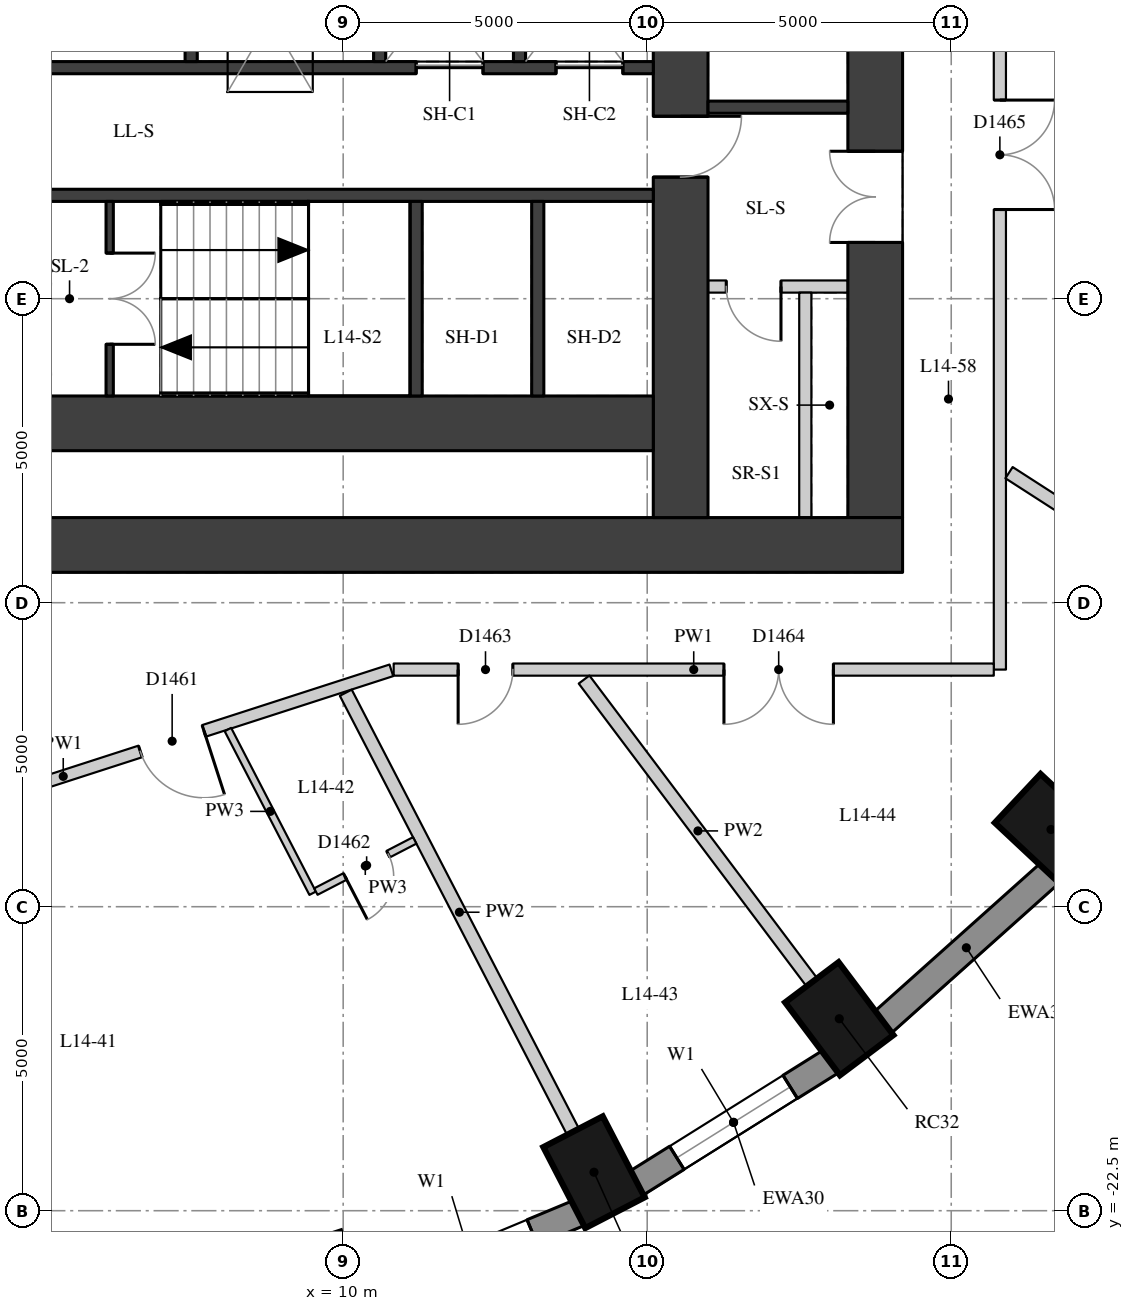
"""IFC4 building model, lengths in metres.
Left out: names, types, materials, properties, quantities, classifications, styles, units other than length and angle.
Written with IfcOpenShell. Run it as: python <this file> out.ifc"""

import sys

from ifc_helpers import new_model, si_unit, direction, frame, frame_2d, origin, origin_2d, place, context, subcontext, project, spatial, rectangle, extrude, element, fill, save


model = new_model("IFC4")
c1 = context("Model", 3, precision=1e-05, world=origin(), true_north=direction((0.0, 1.0)))
c2 = subcontext(c1, "Body", "Model", "MODEL_VIEW")
j1 = project(units=[si_unit("LENGTHUNIT", "METRE"), si_unit("PLANEANGLEUNIT", "RADIAN")], contexts=[c1])
p1 = place(None, origin())
s1 = spatial("IfcSite", under=j1, at=p1, CompositionType="ELEMENT")
p2 = place(p1, origin())
s2 = spatial("IfcBuilding", under=s1, at=p2, CompositionType="ELEMENT")
p3 = place(p2, frame((0.0, 0.0, 54.7)))
s3 = spatial("IfcBuildingStorey", under=s2, at=p3, CompositionType="ELEMENT", Elevation=54.7)
for number, where, z_axis, x_axis in (
    (1, (14.125, -21.867, 0.0), (0.0, 0.0, 1.0), (0.46, -0.888, 0.0)),
    (2, (18.159, -19.343, 0.0), (0.0, 0.0, 1.0), (0.601, -0.799, 0.0)),
    (3, (21.641, -16.23, 0.0), (0.0, 0.0, 1.0), (0.73, -0.683, 0.0)),
):
    element("IfcColumn", number, at=place(p3, frame(where, z_axis=z_axis, x_axis=x_axis)), inside=s3, PredefinedType="COLUMN", context=c2, shape_type="SweptSolid", body=[
        extrude(rectangle(XDim=1.5, YDim=1.1, at=origin_2d()), origin(), (0.0, 0.0, 1.0), 3.3),
    ])
p4 = place(p3, frame((10.315, -24.021, 0.0), z_axis=(0.0, 0.0, 1.0), x_axis=(0.923031964282, 0.384723267966, 0.0)))
e4 = element("IfcWall", 4, at=p4, inside=s3, PredefinedType="SOLIDWALL", context=c2, shape_type="SweptSolid", body=[
    extrude(rectangle(XDim=3.856, YDim=0.45, at=frame_2d((1.928, 0.0))), origin(), (0.0, 0.0, 1.0), 3.02),
])
p5 = place(p4, frame((0.828, 0.0, 0.4)))
e5 = element("IfcOpeningElement", 5, at=p5, cuts=e4, PredefinedType="OPENING", context=c2, shape_type="SweptSolid", body=[
    extrude(rectangle(XDim=2.2, YDim=1.75, at=frame_2d((1.1, 0.875))), frame((0.0, 0.235, 0.0), z_axis=(0.0, -1.0, 0.0), x_axis=(1.0, 0.0, 0.0)), (0.0, 0.0, 1.0), 0.47),
])
p6 = place(p3, frame((14.817, -22.051, 0.0), z_axis=(0.0, 0.0, 1.0), x_axis=(0.847635480093, 0.530579016629, 0.0)))
e6 = element("IfcWall", 6, at=p6, inside=s3, PredefinedType="SOLIDWALL", context=c2, shape_type="SweptSolid", body=[
    extrude(rectangle(XDim=3.782, YDim=0.45, at=frame_2d((1.891, 0.0))), origin(), (0.0, 0.0, 1.0), 3.02),
])
p7 = place(p6, frame((0.791, 0.0, 0.4)))
e7 = element("IfcOpeningElement", 7, at=p7, cuts=e6, PredefinedType="OPENING", context=c2, shape_type="SweptSolid", body=[
    extrude(rectangle(XDim=2.2, YDim=1.75, at=frame_2d((1.1, 0.875))), frame((0.0, 0.235, 0.0), z_axis=(0.0, -1.0, 0.0), x_axis=(1.0, 0.0, 0.0)), (0.0, 0.0, 1.0), 0.47),
])
p8 = place(p3, frame((18.871, -19.407, 0.0), z_axis=(0.0, 0.0, 1.0), x_axis=(0.745526233716, 0.66647628228, 0.0)))
e8 = element("IfcWall", 8, at=p8, inside=s3, PredefinedType="SOLIDWALL", context=c2, shape_type="SweptSolid", body=[
    extrude(rectangle(XDim=3.697, YDim=0.45, at=frame_2d((1.848, 0.0))), origin(), (0.0, 0.0, 1.0), 3.02),
])
p9 = place(p3, frame((18.75, -11.1, 0.0), z_axis=(0.0, 0.0, 1.0), x_axis=(0.0, 1.0, 0.0)))
e9 = element("IfcWall", 9, at=p9, inside=s3, PredefinedType="SHEAR", context=c2, shape_type="SweptSolid", body=[
    extrude(rectangle(XDim=22.2, YDim=0.9, at=frame_2d((11.1, 0.0))), origin(), (0.0, 0.0, 1.0), 3.02),
])
p10 = place(p9, frame((15.925, 0.0, 0.0)))
e10 = element("IfcOpeningElement", 10, at=p10, cuts=e9, PredefinedType="OPENING", context=c2, shape_type="SweptSolid", body=[
    extrude(rectangle(XDim=1.5, YDim=2.1, at=frame_2d((0.75, 1.05))), frame((0.0, 0.46, 0.0), z_axis=(0.0, -1.0, 0.0), x_axis=(1.0, 0.0, 0.0)), (0.0, 0.0, 1.0), 0.92),
])
p11 = place(p9, frame((4.525, 0.0, 0.0)))
e11 = element("IfcOpeningElement", 11, at=p11, cuts=e9, PredefinedType="OPENING", context=c2, shape_type="SweptSolid", body=[
    extrude(rectangle(XDim=1.5, YDim=2.1, at=frame_2d((0.75, 1.05))), frame((0.0, 0.46, 0.0), z_axis=(0.0, -1.0, 0.0), x_axis=(1.0, 0.0, 0.0)), (0.0, 0.0, 1.0), 0.92),
])
p12 = place(p3, frame((4.0, -11.55, 0.0), z_axis=(0.0, 0.0, 1.0), x_axis=(1.0, 0.0, 0.0)))
e12 = element("IfcWall", 12, at=p12, inside=s3, PredefinedType="SHEAR", context=c2, shape_type="SweptSolid", body=[
    extrude(rectangle(XDim=15.2, YDim=0.9, at=frame_2d((7.6, 0.0))), origin(), (0.0, 0.0, 1.0), 3.02),
])
p13 = place(p3, frame((15.55, -11.1, 0.0), z_axis=(0.0, 0.0, 1.0), x_axis=(0.0, 1.0, 0.0)))
e13 = element("IfcWall", 13, at=p13, inside=s3, PredefinedType="SHEAR", context=c2, shape_type="SweptSolid", body=[
    extrude(rectangle(XDim=22.2, YDim=0.9, at=frame_2d((11.1, 0.0))), origin(), (0.0, 0.0, 1.0), 3.02),
])
p14 = place(p13, frame((15.6, 0.0, 0.0)))
e14 = element("IfcOpeningElement", 14, at=p14, cuts=e13, PredefinedType="OPENING", context=c2, shape_type="SweptSolid", body=[
    extrude(rectangle(XDim=1.0, YDim=2.1, at=frame_2d((0.5, 1.05))), frame((0.0, 0.46, 0.0), z_axis=(0.0, -1.0, 0.0), x_axis=(1.0, 0.0, 0.0)), (0.0, 0.0, 1.0), 0.92),
])
p15 = place(p13, frame((5.6, 0.0, 0.0)))
e15 = element("IfcOpeningElement", 15, at=p15, cuts=e13, PredefinedType="OPENING", context=c2, shape_type="SweptSolid", body=[
    extrude(rectangle(XDim=1.0, YDim=2.1, at=frame_2d((0.5, 1.05))), frame((0.0, 0.46, 0.0), z_axis=(0.0, -1.0, 0.0), x_axis=(1.0, 0.0, 0.0)), (0.0, 0.0, 1.0), 0.92),
])
p16 = place(p3, frame((4.9, -9.55, 0.0), z_axis=(0.0, 0.0, 1.0), x_axis=(1.0, 0.0, 0.0)))
e16 = element("IfcWall", 16, at=p16, inside=s3, PredefinedType="SHEAR", context=c2, shape_type="SweptSolid", body=[
    extrude(rectangle(XDim=10.2, YDim=0.9, at=frame_2d((5.1, 0.0))), origin(), (0.0, 0.0, 1.0), 3.02),
])
p17 = place(p3, frame((4.9, -3.7, 0.0), z_axis=(0.0, 0.0, 1.0), x_axis=(1.0, 0.0, 0.0)))
e17 = element("IfcWall", 17, at=p17, inside=s3, PredefinedType="SHEAR", context=c2, shape_type="SweptSolid", body=[
    extrude(rectangle(XDim=10.2, YDim=0.2, at=frame_2d((5.1, 0.0))), origin(), (0.0, 0.0, 1.0), 3.02),
])
p18 = place(p17, frame((6.3, 0.0, 0.0)))
e18 = element("IfcOpeningElement", 18, at=p18, cuts=e17, PredefinedType="OPENING", context=c2, shape_type="SweptSolid", body=[
    extrude(rectangle(XDim=1.1, YDim=2.1, at=frame_2d((0.55, 1.05))), frame((0.0, 0.11, 0.0), z_axis=(0.0, -1.0, 0.0), x_axis=(1.0, 0.0, 0.0)), (0.0, 0.0, 1.0), 0.22),
])
p19 = place(p17, frame((8.6, 0.0, 0.0)))
e19 = element("IfcOpeningElement", 19, at=p19, cuts=e17, PredefinedType="OPENING", context=c2, shape_type="SweptSolid", body=[
    extrude(rectangle(XDim=1.1, YDim=2.1, at=frame_2d((0.55, 1.05))), frame((0.0, 0.11, 0.0), z_axis=(0.0, -1.0, 0.0), x_axis=(1.0, 0.0, 0.0)), (0.0, 0.0, 1.0), 0.22),
])
p20 = place(p3, frame((4.9, -5.8, 0.0), z_axis=(0.0, 0.0, 1.0), x_axis=(1.0, 0.0, 0.0)))
e20 = element("IfcWall", 20, at=p20, inside=s3, PredefinedType="SHEAR", context=c2, shape_type="SweptSolid", body=[
    extrude(rectangle(XDim=10.2, YDim=0.2, at=frame_2d((5.1, 0.0))), origin(), (0.0, 0.0, 1.0), 3.02),
])
for number, where, z_axis, x_axis in (
    (21, (11.2, -9.1, 0.0), (0.0, 0.0, 1.0), (0.0, 1.0, 0.0)),
    (22, (13.2, -9.1, 0.0), (0.0, 0.0, 1.0), (0.0, 1.0, 0.0)),
):
    element("IfcWall", number, at=place(p3, frame(where, z_axis=z_axis, x_axis=x_axis)), inside=s3, PredefinedType="SHEAR", context=c2, shape_type="SweptSolid", body=[
        extrude(rectangle(XDim=3.2, YDim=0.2, at=frame_2d((1.6, 0.0))), origin(), (0.0, 0.0, 1.0), 3.02),
    ])
p21 = place(p3, frame((7.5, -3.6, 0.0), z_axis=(0.0, 0.0, 1.0), x_axis=(0.0, 1.0, 0.0)))
e23 = element("IfcWall", 23, at=p21, inside=s3, PredefinedType="SHEAR", context=c2, shape_type="SweptSolid", body=[
    extrude(rectangle(XDim=2.5, YDim=0.2, at=frame_2d((1.25, 0.0))), origin(), (0.0, 0.0, 1.0), 3.02),
])
p22 = place(p21, frame((0.7, 0.0, 0.0)))
e24 = element("IfcOpeningElement", 24, at=p22, cuts=e23, PredefinedType="OPENING", context=c2, shape_type="SweptSolid", body=[
    extrude(rectangle(XDim=1.1, YDim=2.1, at=frame_2d((0.55, 1.05))), frame((0.0, 0.11, 0.0), z_axis=(0.0, -1.0, 0.0), x_axis=(1.0, 0.0, 0.0)), (0.0, 0.0, 1.0), 0.22),
])
for number, where, z_axis, x_axis in (
    (25, (10.6, -3.6, 0.0), (0.0, 0.0, 1.0), (0.0, 1.0, 0.0)),
    (26, (12.9, -3.6, 0.0), (0.0, 0.0, 1.0), (0.0, 1.0, 0.0)),
):
    element("IfcWall", number, at=place(p3, frame(where, z_axis=z_axis, x_axis=x_axis)), inside=s3, PredefinedType="SHEAR", context=c2, shape_type="SweptSolid", body=[
        extrude(rectangle(XDim=2.5, YDim=0.2, at=frame_2d((1.25, 0.0))), origin(), (0.0, 0.0, 1.0), 3.02),
    ])
p23 = place(p3, frame((6.16, -9.1, 0.0), z_axis=(0.0, 0.0, 1.0), x_axis=(0.0, 1.0, 0.0)))
e27 = element("IfcWall", 27, at=p23, inside=s3, PredefinedType="SHEAR", context=c2, shape_type="SweptSolid", body=[
    extrude(rectangle(XDim=3.2, YDim=0.12, at=frame_2d((1.6, 0.0))), origin(), (0.0, 0.0, 1.0), 3.02),
])
p24 = place(p23, frame((0.85, 0.0, 0.0)))
e28 = element("IfcOpeningElement", 28, at=p24, cuts=e27, PredefinedType="OPENING", context=c2, shape_type="SweptSolid", body=[
    extrude(rectangle(XDim=1.5, YDim=2.1, at=frame_2d((0.75, 1.05))), frame((0.0, 0.07, 0.0), z_axis=(0.0, -1.0, 0.0), x_axis=(1.0, 0.0, 0.0)), (0.0, 0.0, 1.0), 0.14),
])
p25 = place(p3, frame((16.0, -4.35, 0.0), z_axis=(0.0, 0.0, 1.0), x_axis=(1.0, 0.0, 0.0)))
e29 = element("IfcWall", 29, at=p25, inside=s3, PredefinedType="SHEAR", context=c2, shape_type="SweptSolid", body=[
    extrude(rectangle(XDim=2.3, YDim=0.2, at=frame_2d((1.15, 0.0))), origin(), (0.0, 0.0, 1.0), 3.02),
])
p26 = place(p3, frame((16.0, -7.3, 0.0), z_axis=(0.0, 0.0, 1.0), x_axis=(1.0, 0.0, 0.0)))
e30 = element("IfcWall", 30, at=p26, inside=s3, PredefinedType="PARTITIONING", context=c2, shape_type="SweptSolid", body=[
    extrude(rectangle(XDim=2.3, YDim=0.2, at=frame_2d((1.15, 0.0))), origin(), (0.0, 0.0, 1.0), 3.02),
])
p27 = place(p26, frame((0.3, 0.0, 0.0)))
e31 = element("IfcOpeningElement", 31, at=p27, cuts=e30, PredefinedType="OPENING", context=c2, shape_type="SweptSolid", body=[
    extrude(rectangle(XDim=0.9, YDim=2.1, at=frame_2d((0.45, 1.05))), frame((0.0, 0.11, 0.0), z_axis=(0.0, -1.0, 0.0), x_axis=(1.0, 0.0, 0.0)), (0.0, 0.0, 1.0), 0.22),
])
p28 = place(p3, frame((17.6, -11.1, 0.0), z_axis=(0.0, 0.0, 1.0), x_axis=(0.0, 1.0, 0.0)))
e32 = element("IfcWall", 32, at=p28, inside=s3, PredefinedType="PARTITIONING", context=c2, shape_type="SweptSolid", body=[
    extrude(rectangle(XDim=3.7, YDim=0.2, at=frame_2d((1.85, 0.0))), origin(), (0.0, 0.0, 1.0), 3.02),
])
p29 = place(p3, frame((20.8, 13.5, 0.0), z_axis=(0.0, 0.0, 1.0), x_axis=(0.0, -1.0, 0.0)))
e33 = element("IfcWall", 33, at=p29, inside=s3, PredefinedType="PARTITIONING", context=c2, shape_type="SweptSolid", body=[
    extrude(rectangle(XDim=27.1, YDim=0.2, at=frame_2d((13.55, 0.0))), origin(), (0.0, 0.0, 1.0), 3.02),
])
p30 = place(p29, frame((17.733, 0.0, 0.0)))
e34 = element("IfcOpeningElement", 34, at=p30, cuts=e33, PredefinedType="OPENING", context=c2, shape_type="SweptSolid", body=[
    extrude(rectangle(XDim=1.8, YDim=2.1, at=frame_2d((0.9, 1.05))), frame((0.0, 0.11, 0.0), z_axis=(0.0, -1.0, 0.0), x_axis=(1.0, 0.0, 0.0)), (0.0, 0.0, 1.0), 0.22),
])
p31 = place(p29, frame((9.448, 0.0, 0.0)))
e35 = element("IfcOpeningElement", 35, at=p31, cuts=e33, PredefinedType="OPENING", context=c2, shape_type="SweptSolid", body=[
    extrude(rectangle(XDim=1.8, YDim=2.1, at=frame_2d((0.9, 1.05))), frame((0.0, 0.11, 0.0), z_axis=(0.0, -1.0, 0.0), x_axis=(1.0, 0.0, 0.0)), (0.0, 0.0, 1.0), 0.22),
])
p32 = place(p29, frame((2.704, 0.0, 0.0)))
e36 = element("IfcOpeningElement", 36, at=p32, cuts=e33, PredefinedType="OPENING", context=c2, shape_type="SweptSolid", body=[
    extrude(rectangle(XDim=1.8, YDim=2.1, at=frame_2d((0.9, 1.05))), frame((0.0, 0.11, 0.0), z_axis=(0.0, -1.0, 0.0), x_axis=(1.0, 0.0, 0.0)), (0.0, 0.0, 1.0), 0.22),
])
p33 = place(p3, frame((20.7, -13.6, 0.0), z_axis=(0.0, 0.0, 1.0), x_axis=(-1.0, 0.0, 0.0)))
e37 = element("IfcWall", 37, at=p33, inside=s3, PredefinedType="PARTITIONING", context=c2, shape_type="SweptSolid", body=[
    extrude(rectangle(XDim=9.87, YDim=0.2, at=frame_2d((4.935, 0.0))), origin(), (0.0, 0.0, 1.0), 3.02),
])
p34 = place(p33, frame((7.909, 0.0, 0.0)))
e38 = element("IfcOpeningElement", 38, at=p34, cuts=e37, PredefinedType="OPENING", context=c2, shape_type="SweptSolid", body=[
    extrude(rectangle(XDim=0.9, YDim=2.1, at=frame_2d((0.45, 1.05))), frame((0.0, 0.11, 0.0), z_axis=(0.0, -1.0, 0.0), x_axis=(1.0, 0.0, 0.0)), (0.0, 0.0, 1.0), 0.22),
])
p35 = place(p33, frame((2.638, 0.0, 0.0)))
e39 = element("IfcOpeningElement", 39, at=p35, cuts=e37, PredefinedType="OPENING", context=c2, shape_type="SweptSolid", body=[
    extrude(rectangle(XDim=1.8, YDim=2.1, at=frame_2d((0.9, 1.05))), frame((0.0, 0.11, 0.0), z_axis=(0.0, -1.0, 0.0), x_axis=(1.0, 0.0, 0.0)), (0.0, 0.0, 1.0), 0.22),
])
p36 = place(p3, frame((10.792, -13.612, 0.0), z_axis=(0.0, 0.0, 1.0), x_axis=(-0.951542928403, -0.307515943336, 0.0)))
e40 = element("IfcWall", 40, at=p36, inside=s3, PredefinedType="PARTITIONING", context=c2, shape_type="SweptSolid", body=[
    extrude(rectangle(XDim=11.342, YDim=0.2, at=frame_2d((5.671, 0.0))), origin(), (0.0, 0.0, 1.0), 3.02),
])
p37 = place(p36, frame((3.239, 0.0, 0.0)))
e41 = element("IfcOpeningElement", 41, at=p37, cuts=e40, PredefinedType="OPENING", context=c2, shape_type="SweptSolid", body=[
    extrude(rectangle(XDim=1.1, YDim=2.1, at=frame_2d((0.55, 1.05))), frame((0.0, 0.11, 0.0), z_axis=(0.0, -1.0, 0.0), x_axis=(1.0, 0.0, 0.0)), (0.0, 0.0, 1.0), 0.22),
])
p38 = place(p3, frame((13.78, -21.201, 0.0), z_axis=(0.0, 0.0, 1.0), x_axis=(-0.459685115008, 0.888081975405, 0.0)))
e42 = element("IfcWall", 42, at=p38, inside=s3, PredefinedType="PARTITIONING", context=c2, shape_type="SweptSolid", body=[
    extrude(rectangle(XDim=8.131, YDim=0.22, at=frame_2d((4.065, 0.0))), origin(), (0.0, 0.0, 1.0), 3.02),
])
p39 = place(p3, frame((17.708, -18.743, 0.0), z_axis=(0.0, 0.0, 1.0), x_axis=(-0.601177883261, 0.799115231164, 0.0)))
e43 = element("IfcWall", 43, at=p39, inside=s3, PredefinedType="PARTITIONING", context=c2, shape_type="SweptSolid", body=[
    extrude(rectangle(XDim=6.231, YDim=0.22, at=frame_2d((3.116, 0.0))), origin(), (0.0, 0.0, 1.0), 3.02),
])
p40 = place(p3, frame((23.835, -12.219, 0.0), z_axis=(0.0, 0.0, 1.0), x_axis=(-0.840694872373, 0.541509124176, 0.0)))
e44 = element("IfcWall", 44, at=p40, inside=s3, PredefinedType="PARTITIONING", context=c2, shape_type="SweptSolid", body=[
    extrude(rectangle(XDim=3.43, YDim=0.22, at=frame_2d((1.715, 0.0))), origin(), (0.0, 0.0, 1.0), 3.02),
])
p41 = place(p3, frame((8.104, -14.586, 0.0), z_axis=(0.0, 0.0, 1.0), x_axis=(0.459668270166, -0.888090694357, 0.0)))
e45 = element("IfcWall", 45, at=p41, inside=s3, PredefinedType="PARTITIONING", context=c2, shape_type="SweptSolid", body=[
    extrude(rectangle(XDim=3.032, YDim=0.12, at=frame_2d((1.516, 0.0))), origin(), (0.0, 0.0, 1.0), 3.02),
])
p42 = place(p3, frame((9.551, -17.251, 0.0), z_axis=(0.0, 0.0, 1.0), x_axis=(0.88806930088, 0.459709600546, 0.0)))
e46 = element("IfcWall", 46, at=p42, inside=s3, PredefinedType="PARTITIONING", context=c2, shape_type="SweptSolid", body=[
    extrude(rectangle(XDim=1.83, YDim=0.12, at=frame_2d((0.915, 0.0))), origin(), (0.0, 0.0, 1.0), 3.02),
])
p43 = place(p42, frame((0.54, 0.0, 0.0)))
e47 = element("IfcOpeningElement", 47, at=p43, cuts=e46, PredefinedType="OPENING", context=c2, shape_type="SweptSolid", body=[
    extrude(rectangle(XDim=0.8, YDim=2.1, at=frame_2d((0.4, 1.05))), frame((0.0, 0.07, 0.0), z_axis=(0.0, -1.0, 0.0), x_axis=(1.0, 0.0, 0.0)), (0.0, 0.0, 1.0), 0.14),
])
p44 = place(p5, origin())
e48 = element("IfcWindow", 48, at=p44, inside=s3, PartitioningType="SINGLE_PANEL", PredefinedType="WINDOW", context=c2, shape_type="SweptSolid", body=[
    extrude(rectangle(XDim=2.2, YDim=1.75, at=frame_2d((1.1, 0.875))), frame((0.0, 0.035, 0.0), z_axis=(0.0, -1.0, 0.0), x_axis=(1.0, 0.0, 0.0)), (0.0, 0.0, 1.0), 0.06),
])
fill(e5, e48)
p45 = place(p7, origin())
e49 = element("IfcWindow", 49, at=p45, inside=s3, PartitioningType="SINGLE_PANEL", PredefinedType="WINDOW", context=c2, shape_type="SweptSolid", body=[
    extrude(rectangle(XDim=2.2, YDim=1.75, at=frame_2d((1.1, 0.875))), frame((0.0, 0.035, 0.0), z_axis=(0.0, -1.0, 0.0), x_axis=(1.0, 0.0, 0.0)), (0.0, 0.0, 1.0), 0.06),
])
fill(e7, e49)
p46 = place(p11, origin())
e50 = element("IfcDoor", 50, at=p46, inside=s3, OperationType="DOUBLE_DOOR_SINGLE_SWING", PredefinedType="DOOR", context=c2, shape_type="SweptSolid", body=[
    extrude(rectangle(XDim=1.5, YDim=2.1, at=frame_2d((0.75, 1.05))), frame((0.0, 0.025, 0.0), z_axis=(0.0, -1.0, 0.0), x_axis=(1.0, 0.0, 0.0)), (0.0, 0.0, 1.0), 0.05),
])
fill(e11, e50)
p47 = place(p24, origin())
e51 = element("IfcDoor", 51, at=p47, inside=s3, OperationType="DOUBLE_DOOR_SINGLE_SWING", PredefinedType="DOOR", context=c2, shape_type="SweptSolid", body=[
    extrude(rectangle(XDim=1.5, YDim=2.1, at=frame_2d((0.75, 1.05))), frame((0.0, 0.025, 0.0), z_axis=(0.0, -1.0, 0.0), x_axis=(1.0, 0.0, 0.0)), (0.0, 0.0, 1.0), 0.05),
])
fill(e28, e51)
p48 = place(p18, origin())
e52 = element("IfcDoor", 52, at=p48, inside=s3, OperationType="DOUBLE_DOOR_SLIDING", PredefinedType="DOOR", context=c2, shape_type="SweptSolid", body=[
    extrude(rectangle(XDim=1.1, YDim=2.1, at=frame_2d((0.55, 1.05))), frame((0.0, 0.025, 0.0), z_axis=(0.0, -1.0, 0.0), x_axis=(1.0, 0.0, 0.0)), (0.0, 0.0, 1.0), 0.05),
])
fill(e18, e52)
p49 = place(p19, origin())
e53 = element("IfcDoor", 53, at=p49, inside=s3, OperationType="DOUBLE_DOOR_SLIDING", PredefinedType="DOOR", context=c2, shape_type="SweptSolid", body=[
    extrude(rectangle(XDim=1.1, YDim=2.1, at=frame_2d((0.55, 1.05))), frame((0.0, 0.025, 0.0), z_axis=(0.0, -1.0, 0.0), x_axis=(1.0, 0.0, 0.0)), (0.0, 0.0, 1.0), 0.05),
])
fill(e19, e53)
p50 = place(p15, origin())
e54 = element("IfcDoor", 54, at=p50, inside=s3, OperationType="SINGLE_SWING_LEFT", PredefinedType="DOOR", context=c2, shape_type="SweptSolid", body=[
    extrude(rectangle(XDim=1.0, YDim=2.1, at=frame_2d((0.5, 1.05))), frame((0.0, 0.025, 0.0), z_axis=(0.0, -1.0, 0.0), x_axis=(1.0, 0.0, 0.0)), (0.0, 0.0, 1.0), 0.05),
])
fill(e15, e54)
p51 = place(p27, origin())
e55 = element("IfcDoor", 55, at=p51, inside=s3, OperationType="SINGLE_SWING_LEFT", PredefinedType="DOOR", context=c2, shape_type="SweptSolid", body=[
    extrude(rectangle(XDim=0.9, YDim=2.1, at=frame_2d((0.45, 1.05))), frame((0.0, 0.025, 0.0), z_axis=(0.0, -1.0, 0.0), x_axis=(1.0, 0.0, 0.0)), (0.0, 0.0, 1.0), 0.05),
])
fill(e31, e55)
p52 = place(p37, origin())
e56 = element("IfcDoor", 56, at=p52, inside=s3, OperationType="SINGLE_SWING_LEFT", PredefinedType="DOOR", context=c2, shape_type="SweptSolid", body=[
    extrude(rectangle(XDim=1.1, YDim=2.1, at=frame_2d((0.55, 1.05))), frame((0.0, 0.025, 0.0), z_axis=(0.0, -1.0, 0.0), x_axis=(1.0, 0.0, 0.0)), (0.0, 0.0, 1.0), 0.05),
])
fill(e41, e56)
p53 = place(p43, origin())
e57 = element("IfcDoor", 57, at=p53, inside=s3, OperationType="SINGLE_SWING_RIGHT", PredefinedType="DOOR", context=c2, shape_type="SweptSolid", body=[
    extrude(rectangle(XDim=0.8, YDim=2.1, at=frame_2d((0.4, 1.05))), frame((0.0, 0.025, 0.0), z_axis=(0.0, -1.0, 0.0), x_axis=(1.0, 0.0, 0.0)), (0.0, 0.0, 1.0), 0.05),
])
fill(e47, e57)
p54 = place(p34, origin())
e58 = element("IfcDoor", 58, at=p54, inside=s3, OperationType="SINGLE_SWING_RIGHT", PredefinedType="DOOR", context=c2, shape_type="SweptSolid", body=[
    extrude(rectangle(XDim=0.9, YDim=2.1, at=frame_2d((0.45, 1.05))), frame((0.0, 0.025, 0.0), z_axis=(0.0, -1.0, 0.0), x_axis=(1.0, 0.0, 0.0)), (0.0, 0.0, 1.0), 0.05),
])
fill(e38, e58)
p55 = place(p35, origin())
e59 = element("IfcDoor", 59, at=p55, inside=s3, OperationType="DOUBLE_DOOR_SINGLE_SWING", PredefinedType="DOOR", context=c2, shape_type="SweptSolid", body=[
    extrude(rectangle(XDim=1.8, YDim=2.1, at=frame_2d((0.9, 1.05))), frame((0.0, 0.025, 0.0), z_axis=(0.0, -1.0, 0.0), x_axis=(1.0, 0.0, 0.0)), (0.0, 0.0, 1.0), 0.05),
])
fill(e39, e59)
p56 = place(p30, origin())
e60 = element("IfcDoor", 60, at=p56, inside=s3, OperationType="DOUBLE_DOOR_SINGLE_SWING", PredefinedType="DOOR", context=c2, shape_type="SweptSolid", body=[
    extrude(rectangle(XDim=1.8, YDim=2.1, at=frame_2d((0.9, 1.05))), frame((0.0, 0.025, 0.0), z_axis=(0.0, -1.0, 0.0), x_axis=(1.0, 0.0, 0.0)), (0.0, 0.0, 1.0), 0.05),
])
fill(e34, e60)
save(model, sys.argv[1])
